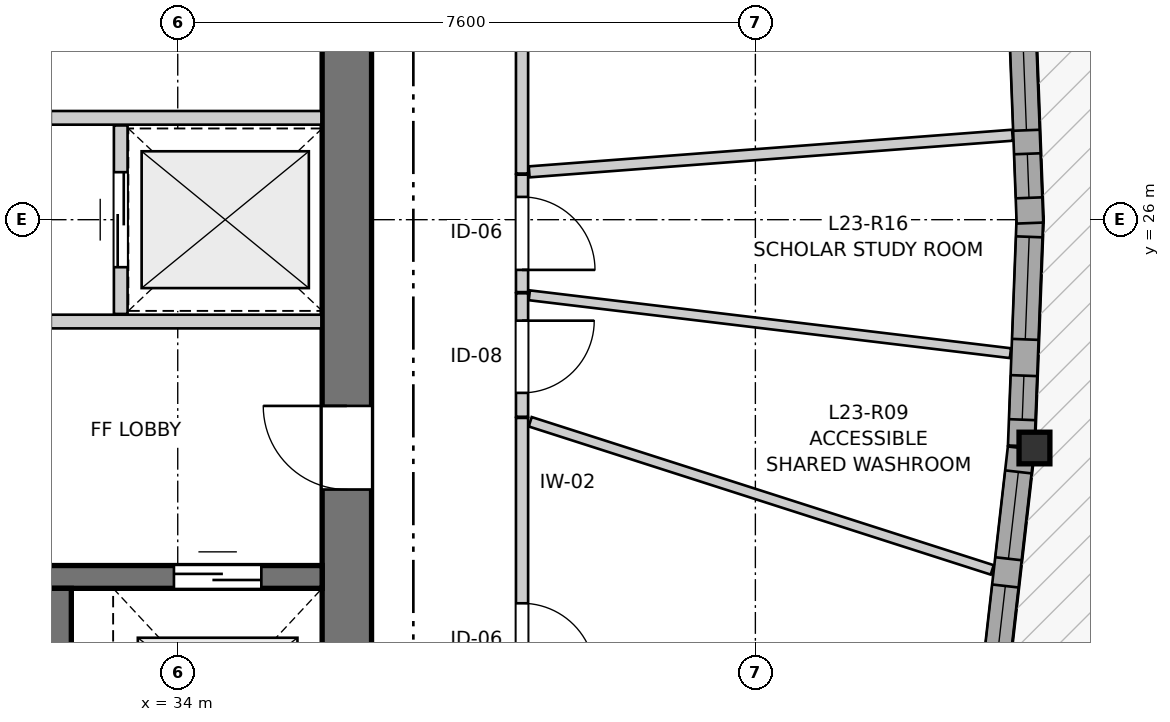
"""IFC4 building model, lengths in metres.
Left out: names, types, materials, properties, quantities, classifications, styles, units other than length and angle.
Written with IfcOpenShell. Run it as: python <this file> out.ifc"""

import sys

from ifc_helpers import new_model, si_unit, direction, frame, frame_2d, origin, origin_2d, place, context, subcontext, project, spatial, rectangle, i_section, extrude, source, transform, mapped, element, fill, save


model = new_model("IFC4")
c1 = context("Model", 3, precision=1e-05, world=origin(), true_north=direction((0.0, 1.0)))
c2 = subcontext(c1, "Body", "Model", "MODEL_VIEW")
j1 = project(units=[si_unit("LENGTHUNIT", "METRE"), si_unit("PLANEANGLEUNIT", "RADIAN")], contexts=[c1])
p1 = place(None, origin())
s1 = spatial("IfcSite", under=j1, at=p1, CompositionType="ELEMENT")
p2 = place(p1, origin())
s2 = spatial("IfcBuilding", under=s1, at=p2, CompositionType="ELEMENT")
p3 = place(p2, frame((0.0, 0.0, 80.0)))
s3 = spatial("IfcBuildingStorey", under=s2, at=p3, CompositionType="ELEMENT", Elevation=80.0)
p4 = place(p3, frame((36.225, 18.2, 0.0), z_axis=(0.0, 0.0, 1.0), x_axis=(0.0, 1.0, 0.0)))
e1 = element("IfcWall", 1, at=p4, inside=s3, PredefinedType="SHEAR", context=c2, shape_type="SweptSolid", body=[
    extrude(rectangle(XDim=15.6, YDim=0.65, at=frame_2d((7.8, 0.0))), origin(), (0.0, 0.0, 1.0), 2.935),
])
p5 = place(p4, frame((4.25, 0.0, 0.0)))
e2 = element("IfcOpeningElement", 2, at=p5, cuts=e1, PredefinedType="OPENING", context=c2, shape_type="SweptSolid", body=[
    extrude(rectangle(XDim=1.1, YDim=2.15, at=frame_2d((0.55, 1.075))), frame((0.0, 0.335, 0.0), z_axis=(0.0, -1.0, 0.0), x_axis=(1.0, 0.0, 0.0)), (0.0, 0.0, 1.0), 0.67),
])
p6 = place(p4, frame((10.25, 0.0, 0.0)))
e3 = element("IfcOpeningElement", 3, at=p6, cuts=e1, PredefinedType="OPENING", context=c2, shape_type="SweptSolid", body=[
    extrude(rectangle(XDim=1.1, YDim=2.15, at=frame_2d((0.55, 1.075))), frame((0.0, 0.335, 0.0), z_axis=(0.0, -1.0, 0.0), x_axis=(1.0, 0.0, 0.0)), (0.0, 0.0, 1.0), 0.67),
])
p7 = place(p3, frame((24.8, 21.3, 0.0), z_axis=(0.0, 0.0, 1.0), x_axis=(1.0, 0.0, 0.0)))
e4 = element("IfcWall", 4, at=p7, inside=s3, PredefinedType="SHEAR", context=c2, shape_type="SweptSolid", body=[
    extrude(rectangle(XDim=11.1, YDim=0.3, at=frame_2d((5.55, 0.0))), origin(), (0.0, 0.0, 1.0), 2.935),
])
p8 = place(p7, frame((6.22, 0.0, 0.0)))
e5 = element("IfcOpeningElement", 5, at=p8, cuts=e4, PredefinedType="OPENING", context=c2, shape_type="SweptSolid", body=[
    extrude(rectangle(XDim=0.98, YDim=2.15, at=frame_2d((0.49, 1.075))), frame((0.0, 0.16, 0.0), z_axis=(0.0, -1.0, 0.0), x_axis=(1.0, 0.0, 0.0)), (0.0, 0.0, 1.0), 0.32),
])
p9 = place(p7, frame((9.15, 0.0, 0.0)))
e6 = element("IfcOpeningElement", 6, at=p9, cuts=e4, PredefinedType="OPENING", context=c2, shape_type="SweptSolid", body=[
    extrude(rectangle(XDim=1.15, YDim=2.15, at=frame_2d((0.575, 1.075))), frame((0.0, 0.16, 0.0), z_axis=(0.0, -1.0, 0.0), x_axis=(1.0, 0.0, 0.0)), (0.0, 0.0, 1.0), 0.32),
])
p10 = place(p3, frame((32.4, 18.2, 0.0), z_axis=(0.0, 0.0, 1.0), x_axis=(0.0, 1.0, 0.0)))
e7 = element("IfcWall", 7, at=p10, inside=s3, PredefinedType="SHEAR", context=c2, shape_type="SweptSolid", body=[
    extrude(rectangle(XDim=2.95, YDim=0.4, at=frame_2d((1.475, 0.0))), origin(), (0.0, 0.0, 1.0), 2.935),
])
m1 = source(origin(), c2, "Body", "SweptSolid", [
    extrude(i_section(OverallWidth=0.406, OverallDepth=0.416, WebThickness=0.027, FlangeThickness=0.044, FilletRadius=0.015, at=origin_2d()), origin(), (0.0, 0.0, 1.0), 2.935),
])
p11 = place(p3, frame((45.272, 22.996, 0.0), z_axis=(0.0, 0.0, 1.0), x_axis=(1.0, 0.0, 0.0)))
e8 = element("IfcColumn", 8, at=p11, inside=s3, PredefinedType="PILASTER", context=c2, shape_type="MappedRepresentation", body=[
    mapped(m1, transform((0.0, 0.0, 0.0), x_axis=(1.0, 0.0, 0.0), y_axis=(0.0, 1.0, 0.0), z_axis=(0.0, 0.0, 1.0), scale=1.0)),
])
p12 = place(p3, frame((44.751, 19.975, 0.0), z_axis=(0.0, 0.0, 1.0), x_axis=(0.113356399423, 0.993554390413, 0.0)))
e9 = element("IfcWall", 9, at=p12, inside=s3, PredefinedType="SOLIDWALL", context=c2, shape_type="SweptSolid", body=[
    extrude(rectangle(XDim=3.041, YDim=0.35, at=frame_2d((1.521, 0.0))), origin(), (0.0, 0.0, 1.0), 2.465),
])
p13 = place(p12, frame((0.264, 0.0, 0.82)))
e10 = element("IfcOpeningElement", 10, at=p13, cuts=e9, PredefinedType="OPENING", context=c2, shape_type="SweptSolid", body=[
    extrude(rectangle(XDim=0.95, YDim=1.35, at=frame_2d((0.475, 0.675))), frame((0.0, 0.185, 0.0), z_axis=(0.0, -1.0, 0.0), x_axis=(1.0, 0.0, 0.0)), (0.0, 0.0, 1.0), 0.37),
])
p14 = place(p12, frame((1.575, 0.0, 0.82)))
e11 = element("IfcOpeningElement", 11, at=p14, cuts=e9, PredefinedType="OPENING", context=c2, shape_type="SweptSolid", body=[
    extrude(rectangle(XDim=1.15, YDim=1.2, at=frame_2d((0.575, 0.6))), frame((0.0, 0.185, 0.0), z_axis=(0.0, -1.0, 0.0), x_axis=(1.0, 0.0, 0.0)), (0.0, 0.0, 1.0), 0.37),
])
p15 = place(p3, frame((45.098, 23.023, 0.0), z_axis=(0.0, 0.0, 1.0), x_axis=(0.037943250197, 0.999279895607, 0.0)))
e12 = element("IfcWall", 12, at=p15, inside=s3, PredefinedType="SOLIDWALL", context=c2, shape_type="SweptSolid", body=[
    extrude(rectangle(XDim=3.024, YDim=0.35, at=frame_2d((1.512, 0.0))), origin(), (0.0, 0.0, 1.0), 2.465),
])
p16 = place(p15, frame((0.346, 0.0, 0.82)))
e13 = element("IfcOpeningElement", 13, at=p16, cuts=e12, PredefinedType="OPENING", context=c2, shape_type="SweptSolid", body=[
    extrude(rectangle(XDim=0.58, YDim=1.35, at=frame_2d((0.29, 0.675))), frame((0.0, 0.185, 0.0), z_axis=(0.0, -1.0, 0.0), x_axis=(1.0, 0.0, 0.0)), (0.0, 0.0, 1.0), 0.37),
])
p17 = place(p15, frame((1.404, 0.0, 0.82)))
e14 = element("IfcOpeningElement", 14, at=p17, cuts=e12, PredefinedType="OPENING", context=c2, shape_type="SweptSolid", body=[
    extrude(rectangle(XDim=1.35, YDim=1.45, at=frame_2d((0.675, 0.725))), frame((0.0, 0.185, 0.0), z_axis=(0.0, -1.0, 0.0), x_axis=(1.0, 0.0, 0.0)), (0.0, 0.0, 1.0), 0.37),
])
p18 = place(p3, frame((45.213, 25.955, 0.0), z_axis=(0.0, 0.0, 1.0), x_axis=(-0.037934195255, 0.999280239388, 0.0)))
e15 = element("IfcWall", 15, at=p18, inside=s3, PredefinedType="SOLIDWALL", context=c2, shape_type="SweptSolid", body=[
    extrude(rectangle(XDim=2.819, YDim=0.35, at=frame_2d((1.409, 0.0))), origin(), (0.0, 0.0, 1.0), 2.465),
])
p19 = place(p18, frame((0.332, 0.0, 0.82)))
e16 = element("IfcOpeningElement", 16, at=p19, cuts=e15, PredefinedType="OPENING", context=c2, shape_type="SweptSolid", body=[
    extrude(rectangle(XDim=0.58, YDim=1.35, at=frame_2d((0.29, 0.675))), frame((0.0, 0.185, 0.0), z_axis=(0.0, -1.0, 0.0), x_axis=(1.0, 0.0, 0.0)), (0.0, 0.0, 1.0), 0.37),
])
p20 = place(p18, frame((1.222, 0.0, 0.82)))
e17 = element("IfcOpeningElement", 17, at=p20, cuts=e15, PredefinedType="OPENING", context=c2, shape_type="SweptSolid", body=[
    extrude(rectangle(XDim=1.15, YDim=1.2, at=frame_2d((0.575, 0.6))), frame((0.0, 0.185, 0.0), z_axis=(0.0, -1.0, 0.0), x_axis=(1.0, 0.0, 0.0)), (0.0, 0.0, 1.0), 0.37),
])
p21 = place(p3, frame((30.67, 24.66, 0.0), z_axis=(0.0, 0.0, 1.0), x_axis=(1.0, 0.0, 0.0)))
e18 = element("IfcWall", 18, at=p21, inside=s3, PredefinedType="PARTITIONING", context=c2, shape_type="SweptSolid", body=[
    extrude(rectangle(XDim=5.22, YDim=0.18, at=frame_2d((2.61, 0.0))), origin(), (0.0, 0.0, 1.0), 2.935),
])
p22 = place(p21, frame((0.68, 0.0, 0.0)))
e19 = element("IfcOpeningElement", 19, at=p22, cuts=e18, PredefinedType="OPENING", context=c2, shape_type="SweptSolid", body=[
    extrude(rectangle(XDim=0.98, YDim=2.15, at=frame_2d((0.49, 1.075))), frame((0.0, 0.1, 0.0), z_axis=(0.0, -1.0, 0.0), x_axis=(1.0, 0.0, 0.0)), (0.0, 0.0, 1.0), 0.2),
])
p23 = place(p3, frame((30.67, 27.34, 0.0), z_axis=(0.0, 0.0, 1.0), x_axis=(1.0, 0.0, 0.0)))
e20 = element("IfcWall", 20, at=p23, inside=s3, PredefinedType="PARTITIONING", context=c2, shape_type="SweptSolid", body=[
    extrude(rectangle(XDim=5.22, YDim=0.18, at=frame_2d((2.61, 0.0))), origin(), (0.0, 0.0, 1.0), 2.935),
])
p24 = place(p23, frame((0.68, 0.0, 0.0)))
e21 = element("IfcOpeningElement", 21, at=p24, cuts=e20, PredefinedType="OPENING", context=c2, shape_type="SweptSolid", body=[
    extrude(rectangle(XDim=0.98, YDim=2.15, at=frame_2d((0.49, 1.075))), frame((0.0, 0.1, 0.0), z_axis=(0.0, -1.0, 0.0), x_axis=(1.0, 0.0, 0.0)), (0.0, 0.0, 1.0), 0.2),
])
p25 = place(p3, frame((33.25, 24.76, 0.0), z_axis=(0.0, 0.0, 1.0), x_axis=(0.0, 1.0, 0.0)))
e22 = element("IfcWall", 22, at=p25, inside=s3, PredefinedType="PARTITIONING", context=c2, shape_type="SweptSolid", body=[
    extrude(rectangle(XDim=2.48, YDim=0.18, at=frame_2d((1.24, 0.0))), origin(), (0.0, 0.0, 1.0), 2.935),
])
p26 = place(p25, frame((0.615, 0.0, 0.0)))
e23 = element("IfcOpeningElement", 23, at=p26, cuts=e22, PredefinedType="OPENING", context=c2, shape_type="SweptSolid", body=[
    extrude(rectangle(XDim=1.25, YDim=2.15, at=frame_2d((0.625, 1.075))), frame((0.0, 0.1, 0.0), z_axis=(0.0, -1.0, 0.0), x_axis=(1.0, 0.0, 0.0)), (0.0, 0.0, 1.0), 0.2),
])
p27 = place(p3, frame((38.53, 23.392, 0.0), z_axis=(0.0, 0.0, 1.0), x_axis=(0.0, -1.0, 0.0)))
e24 = element("IfcWall", 24, at=p27, inside=s3, PredefinedType="PARTITIONING", context=c2, shape_type="SweptSolid", body=[
    extrude(rectangle(XDim=5.843, YDim=0.16, at=frame_2d((2.921, 0.0))), origin(), (0.0, 0.0, 1.0), 2.935),
])
p28 = place(p27, frame((2.438, 0.0, 0.0)))
e25 = element("IfcOpeningElement", 25, at=p28, cuts=e24, PredefinedType="OPENING", context=c2, shape_type="SweptSolid", body=[
    extrude(rectangle(XDim=0.96, YDim=2.1, at=frame_2d((0.48, 1.05))), frame((0.0, 0.09, 0.0), z_axis=(0.0, -1.0, 0.0), x_axis=(1.0, 0.0, 0.0)), (0.0, 0.0, 1.0), 0.18),
])
p29 = place(p3, frame((38.53, 31.856, 0.0), z_axis=(0.0, 0.0, 1.0), x_axis=(0.0, -1.0, 0.0)))
e26 = element("IfcWall", 26, at=p29, inside=s3, PredefinedType="PARTITIONING", context=c2, shape_type="SweptSolid", body=[
    extrude(rectangle(XDim=5.249, YDim=0.16, at=frame_2d((2.625, 0.0))), origin(), (0.0, 0.0, 1.0), 2.935),
])
p30 = place(p29, frame((2.146, 0.0, 0.0)))
e27 = element("IfcOpeningElement", 27, at=p30, cuts=e26, PredefinedType="OPENING", context=c2, shape_type="SweptSolid", body=[
    extrude(rectangle(XDim=0.96, YDim=2.1, at=frame_2d((0.48, 1.05))), frame((0.0, 0.09, 0.0), z_axis=(0.0, -1.0, 0.0), x_axis=(1.0, 0.0, 0.0)), (0.0, 0.0, 1.0), 0.18),
])
p31 = place(p3, frame((38.53, 25.032, 0.0), z_axis=(0.0, 0.0, 1.0), x_axis=(0.0, -1.0, 0.0)))
e28 = element("IfcWall", 28, at=p31, inside=s3, PredefinedType="PARTITIONING", context=c2, shape_type="SweptSolid", body=[
    extrude(rectangle(XDim=1.625, YDim=0.16, at=frame_2d((0.812, 0.0))), origin(), (0.0, 0.0, 1.0), 2.935),
])
p32 = place(p31, frame((0.361, 0.0, 0.0)))
e29 = element("IfcOpeningElement", 29, at=p32, cuts=e28, PredefinedType="OPENING", context=c2, shape_type="SweptSolid", body=[
    extrude(rectangle(XDim=0.95, YDim=2.1, at=frame_2d((0.475, 1.05))), frame((0.0, 0.09, 0.0), z_axis=(0.0, -1.0, 0.0), x_axis=(1.0, 0.0, 0.0)), (0.0, 0.0, 1.0), 0.18),
])
p33 = place(p3, frame((38.53, 26.592, 0.0), z_axis=(0.0, 0.0, 1.0), x_axis=(0.0, -1.0, 0.0)))
e30 = element("IfcWall", 30, at=p33, inside=s3, PredefinedType="PARTITIONING", context=c2, shape_type="SweptSolid", body=[
    extrude(rectangle(XDim=1.545, YDim=0.16, at=frame_2d((0.772, 0.0))), origin(), (0.0, 0.0, 1.0), 2.935),
])
p34 = place(p33, frame((0.292, 0.0, 0.0)))
e31 = element("IfcOpeningElement", 31, at=p34, cuts=e30, PredefinedType="OPENING", context=c2, shape_type="SweptSolid", body=[
    extrude(rectangle(XDim=0.96, YDim=2.1, at=frame_2d((0.48, 1.05))), frame((0.0, 0.09, 0.0), z_axis=(0.0, -1.0, 0.0), x_axis=(1.0, 0.0, 0.0)), (0.0, 0.0, 1.0), 0.18),
])
p35 = place(p3, frame((38.637, 23.342, 0.0), z_axis=(0.0, 0.0, 1.0), x_axis=(0.952253923936, -0.305307163933, 0.0)))
e32 = element("IfcWall", 32, at=p35, inside=s3, PredefinedType="PARTITIONING", context=c2, shape_type="SweptSolid", body=[
    extrude(rectangle(XDim=6.384, YDim=0.13, at=frame_2d((3.192, 0.0))), origin(), (0.0, 0.0, 1.0), 2.935),
])
p36 = place(p3, frame((38.626, 25.006, 0.0), z_axis=(0.0, 0.0, 1.0), x_axis=(0.992837647249, -0.11947136144, 0.0)))
e33 = element("IfcWall", 33, at=p36, inside=s3, PredefinedType="PARTITIONING", context=c2, shape_type="SweptSolid", body=[
    extrude(rectangle(XDim=6.376, YDim=0.13, at=frame_2d((3.188, 0.0))), origin(), (0.0, 0.0, 1.0), 2.935),
])
p37 = place(p3, frame((38.624, 26.629, 0.0), z_axis=(0.0, 0.0, 1.0), x_axis=(0.997137880159, 0.075604549805, 0.0)))
e34 = element("IfcWall", 34, at=p37, inside=s3, PredefinedType="PARTITIONING", context=c2, shape_type="SweptSolid", body=[
    extrude(rectangle(XDim=6.378, YDim=0.145, at=frame_2d((3.189, 0.0))), origin(), (0.0, 0.0, 1.0), 2.935),
])
m2 = source(origin(), c2, "Body", "SweptSolid", [
    extrude(rectangle(XDim=0.95, YDim=1.35, at=frame_2d((0.475, 0.675))), frame((0.0, 0.03, 0.0), z_axis=(0.0, -1.0, 0.0), x_axis=(1.0, 0.0, 0.0)), (0.0, 0.0, 1.0), 0.06),
])
p38 = place(p13, origin())
e35 = element("IfcWindow", 35, at=p38, inside=s3, PartitioningType="SINGLE_PANEL", PredefinedType="WINDOW", context=c2, shape_type="MappedRepresentation", body=[
    mapped(m2, transform((0.0, 0.0, 0.0), x_axis=(1.0, 0.0, 0.0), y_axis=(0.0, 1.0, 0.0), z_axis=(0.0, 0.0, 1.0), scale=1.0)),
])
fill(e10, e35)
m3 = source(origin(), c2, "Body", "SweptSolid", [
    extrude(rectangle(XDim=1.15, YDim=1.2, at=frame_2d((0.575, 0.6))), frame((0.0, 0.03, 0.0), z_axis=(0.0, -1.0, 0.0), x_axis=(1.0, 0.0, 0.0)), (0.0, 0.0, 1.0), 0.06),
])
p39 = place(p14, origin())
e36 = element("IfcWindow", 36, at=p39, inside=s3, PartitioningType="SINGLE_PANEL", PredefinedType="WINDOW", context=c2, shape_type="MappedRepresentation", body=[
    mapped(m3, transform((0.0, 0.0, 0.0), x_axis=(1.0, 0.0, 0.0), y_axis=(0.0, 1.0, 0.0), z_axis=(0.0, 0.0, 1.0), scale=1.0)),
])
fill(e11, e36)
m4 = source(origin(), c2, "Body", "SweptSolid", [
    extrude(rectangle(XDim=0.58, YDim=1.35, at=frame_2d((0.29, 0.675))), frame((0.0, 0.03, 0.0), z_axis=(0.0, -1.0, 0.0), x_axis=(1.0, 0.0, 0.0)), (0.0, 0.0, 1.0), 0.06),
])
p40 = place(p16, origin())
e37 = element("IfcWindow", 37, at=p40, inside=s3, PartitioningType="SINGLE_PANEL", PredefinedType="WINDOW", context=c2, shape_type="MappedRepresentation", body=[
    mapped(m4, transform((0.0, 0.0, 0.0), x_axis=(1.0, 0.0, 0.0), y_axis=(0.0, 1.0, 0.0), z_axis=(0.0, 0.0, 1.0), scale=1.0)),
])
fill(e13, e37)
m5 = source(origin(), c2, "Body", "SweptSolid", [
    extrude(rectangle(XDim=1.35, YDim=1.45, at=frame_2d((0.675, 0.725))), frame((0.0, 0.03, 0.0), z_axis=(0.0, -1.0, 0.0), x_axis=(1.0, 0.0, 0.0)), (0.0, 0.0, 1.0), 0.06),
])
p41 = place(p17, origin())
e38 = element("IfcWindow", 38, at=p41, inside=s3, PartitioningType="SINGLE_PANEL", PredefinedType="WINDOW", context=c2, shape_type="MappedRepresentation", body=[
    mapped(m5, transform((0.0, 0.0, 0.0), x_axis=(1.0, 0.0, 0.0), y_axis=(0.0, 1.0, 0.0), z_axis=(0.0, 0.0, 1.0), scale=1.0)),
])
fill(e14, e38)
p42 = place(p19, origin())
e39 = element("IfcWindow", 39, at=p42, inside=s3, PartitioningType="SINGLE_PANEL", PredefinedType="WINDOW", context=c2, shape_type="MappedRepresentation", body=[
    mapped(m4, transform((0.0, 0.0, 0.0), x_axis=(1.0, 0.0, 0.0), y_axis=(0.0, 1.0, 0.0), z_axis=(0.0, 0.0, 1.0), scale=1.0)),
])
fill(e16, e39)
p43 = place(p20, origin())
e40 = element("IfcWindow", 40, at=p43, inside=s3, PartitioningType="SINGLE_PANEL", PredefinedType="WINDOW", context=c2, shape_type="MappedRepresentation", body=[
    mapped(m3, transform((0.0, 0.0, 0.0), x_axis=(1.0, 0.0, 0.0), y_axis=(0.0, 1.0, 0.0), z_axis=(0.0, 0.0, 1.0), scale=1.0)),
])
fill(e17, e40)
m6 = source(origin(), c2, "Body", "SweptSolid", [
    extrude(rectangle(XDim=1.15, YDim=2.15, at=frame_2d((0.575, 1.075))), frame((0.0, 0.025, 0.0), z_axis=(0.0, -1.0, 0.0), x_axis=(1.0, 0.0, 0.0)), (0.0, 0.0, 1.0), 0.05),
])
p44 = place(p9, origin())
e41 = element("IfcDoor", 41, at=p44, inside=s3, OperationType="DOUBLE_DOOR_SLIDING", PredefinedType="DOOR", context=c2, shape_type="MappedRepresentation", body=[
    mapped(m6, transform((0.0, 0.0, 0.0), x_axis=(1.0, 0.0, 0.0), y_axis=(0.0, 1.0, 0.0), z_axis=(0.0, 0.0, 1.0), scale=1.0)),
])
fill(e6, e41)
m7 = source(origin(), c2, "Body", "SweptSolid", [
    extrude(rectangle(XDim=1.1, YDim=2.15, at=frame_2d((0.55, 1.075))), frame((0.0, 0.025, 0.0), z_axis=(0.0, -1.0, 0.0), x_axis=(1.0, 0.0, 0.0)), (0.0, 0.0, 1.0), 0.05),
])
p45 = place(p5, origin())
e42 = element("IfcDoor", 42, at=p45, inside=s3, OperationType="SINGLE_SWING_RIGHT", PredefinedType="DOOR", context=c2, shape_type="MappedRepresentation", body=[
    mapped(m7, transform((0.0, 0.0, 0.0), x_axis=(1.0, 0.0, 0.0), y_axis=(0.0, 1.0, 0.0), z_axis=(0.0, 0.0, 1.0), scale=1.0)),
])
fill(e2, e42)
m8 = source(origin(), c2, "Body", "SweptSolid", [
    extrude(rectangle(XDim=1.25, YDim=2.15, at=frame_2d((0.625, 1.075))), frame((0.0, 0.025, 0.0), z_axis=(0.0, -1.0, 0.0), x_axis=(1.0, 0.0, 0.0)), (0.0, 0.0, 1.0), 0.05),
])
p46 = place(p26, origin())
e43 = element("IfcDoor", 43, at=p46, inside=s3, OperationType="DOUBLE_DOOR_SLIDING", PredefinedType="DOOR", context=c2, shape_type="MappedRepresentation", body=[
    mapped(m8, transform((0.0, 0.0, 0.0), x_axis=(1.0, 0.0, 0.0), y_axis=(0.0, 1.0, 0.0), z_axis=(0.0, 0.0, 1.0), scale=1.0)),
])
fill(e23, e43)
m9 = source(origin(), c2, "Body", "SweptSolid", [
    extrude(rectangle(XDim=0.96, YDim=2.1, at=frame_2d((0.48, 1.05))), frame((0.0, 0.025, 0.0), z_axis=(0.0, -1.0, 0.0), x_axis=(1.0, 0.0, 0.0)), (0.0, 0.0, 1.0), 0.05),
])
p47 = place(p28, origin())
e44 = element("IfcDoor", 44, at=p47, inside=s3, OperationType="SINGLE_SWING_RIGHT", PredefinedType="DOOR", context=c2, shape_type="MappedRepresentation", body=[
    mapped(m9, transform((0.0, 0.0, 0.0), x_axis=(1.0, 0.0, 0.0), y_axis=(0.0, 1.0, 0.0), z_axis=(0.0, 0.0, 1.0), scale=1.0)),
])
fill(e25, e44)
m10 = source(origin(), c2, "Body", "SweptSolid", [
    extrude(rectangle(XDim=0.95, YDim=2.1, at=frame_2d((0.475, 1.05))), frame((0.0, 0.025, 0.0), z_axis=(0.0, -1.0, 0.0), x_axis=(1.0, 0.0, 0.0)), (0.0, 0.0, 1.0), 0.05),
])
p48 = place(p32, origin())
e45 = element("IfcDoor", 45, at=p48, inside=s3, OperationType="SINGLE_SWING_LEFT", PredefinedType="DOOR", context=c2, shape_type="MappedRepresentation", body=[
    mapped(m10, transform((0.0, 0.0, 0.0), x_axis=(1.0, 0.0, 0.0), y_axis=(0.0, 1.0, 0.0), z_axis=(0.0, 0.0, 1.0), scale=1.0)),
])
fill(e29, e45)
p49 = place(p34, origin())
e46 = element("IfcDoor", 46, at=p49, inside=s3, OperationType="SINGLE_SWING_RIGHT", PredefinedType="DOOR", context=c2, shape_type="MappedRepresentation", body=[
    mapped(m9, transform((0.0, 0.0, 0.0), x_axis=(1.0, 0.0, 0.0), y_axis=(0.0, 1.0, 0.0), z_axis=(0.0, 0.0, 1.0), scale=1.0)),
])
fill(e31, e46)
save(model, sys.argv[1])
